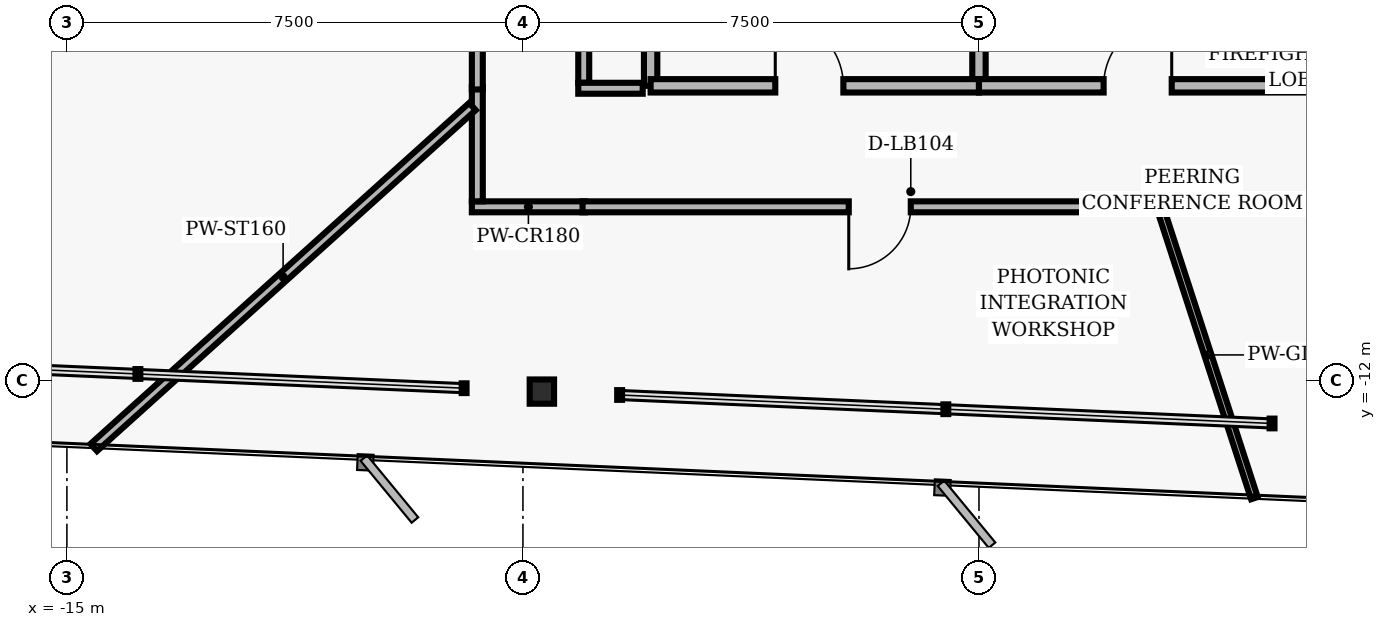
"""IFC4 building model, lengths in metres.
Left out: names, types, materials, properties, quantities, classifications, styles, units other than length and angle.
Written with IfcOpenShell. Run it as: python <this file> out.ifc"""

import sys

from ifc_helpers import new_model, si_unit, direction, frame, frame_2d, origin, origin_2d, place, context, subcontext, project, spatial, rectangle, i_section, extrude, element, fill, save


model = new_model("IFC4")
c1 = context("Model", 3, precision=1e-05, world=origin(), true_north=direction((0.0, 1.0)))
c2 = subcontext(c1, "Body", "Model", "MODEL_VIEW")
j1 = project(units=[si_unit("LENGTHUNIT", "METRE"), si_unit("PLANEANGLEUNIT", "RADIAN")], contexts=[c1])
p1 = place(None, origin())
s1 = spatial("IfcSite", under=j1, at=p1, CompositionType="ELEMENT")
p2 = place(p1, origin())
s2 = spatial("IfcBuilding", under=s1, at=p2, CompositionType="ELEMENT")
p3 = place(p2, frame((0.0, 0.0, 138.08)))
s3 = spatial("IfcBuildingStorey", under=s2, at=p3, CompositionType="ELEMENT", Elevation=138.08)
p4 = place(p3, frame((-7.188, -12.189, 0.0), z_axis=(0.0, 0.0, 1.0), x_axis=(1.0, 0.0, 0.0)))
e1 = element("IfcColumn", 1, at=p4, inside=s3, PredefinedType="COLUMN", context=c2, shape_type="SweptSolid", body=[
    extrude(i_section(OverallWidth=0.401, OverallDepth=0.399, WebThickness=0.025, FlangeThickness=0.04, FilletRadius=0.018, at=origin_2d()), origin(), (0.0, 0.0, 1.0), 3.04),
])
for number, where, z_axis, x_axis in (
    (2, (-5.4, -7.16, 0.0), (0.0, 0.0, 1.0), (0.0, 1.0, 0.0)),
    (3, (5.4, -7.16, 0.0), (0.0, 0.0, 1.0), (0.0, 1.0, 0.0)),
):
    element("IfcWall", number, at=place(p3, frame(where, z_axis=z_axis, x_axis=x_axis)), inside=s3, PredefinedType="PARTITIONING", context=c2, shape_type="SweptSolid", body=[
        extrude(rectangle(XDim=2.71, YDim=0.22, at=frame_2d((1.355, 0.0))), origin(), (0.0, 0.0, 1.0), 2.763),
    ])
p5 = place(p3, frame((0.0, -7.16, 0.0), z_axis=(0.0, 0.0, 1.0), x_axis=(0.0, 1.0, 0.0)))
e4 = element("IfcWall", 4, at=p5, inside=s3, PredefinedType="PARTITIONING", context=c2, shape_type="SweptSolid", body=[
    extrude(rectangle(XDim=2.81, YDim=0.22, at=frame_2d((1.405, 0.0))), origin(), (0.0, 0.0, 1.0), 2.763),
])
p6 = place(p3, frame((-5.4, -7.16, 0.0), z_axis=(0.0, 0.0, 1.0), x_axis=(1.0, 0.0, 0.0)))
e5 = element("IfcWall", 5, at=p6, inside=s3, PredefinedType="PARTITIONING", context=c2, shape_type="SweptSolid", body=[
    extrude(rectangle(XDim=5.4, YDim=0.22, at=frame_2d((2.7, 0.0))), origin(), (0.0, 0.0, 1.0), 2.33),
])
p7 = place(p6, frame((2.05, 0.0, 0.0)))
e6 = element("IfcOpeningElement", 6, at=p7, cuts=e5, PredefinedType="OPENING", context=c2, shape_type="SweptSolid", body=[
    extrude(rectangle(XDim=1.12, YDim=2.02, at=frame_2d((0.56, 1.01))), frame((0.0, 0.12, 0.0), z_axis=(0.0, -1.0, 0.0), x_axis=(1.0, 0.0, 0.0)), (0.0, 0.0, 1.0), 0.24),
])
p8 = place(p3, frame((0.0, -7.16, 0.0), z_axis=(0.0, 0.0, 1.0), x_axis=(1.0, 0.0, 0.0)))
e7 = element("IfcWall", 7, at=p8, inside=s3, PredefinedType="PARTITIONING", context=c2, shape_type="SweptSolid", body=[
    extrude(rectangle(XDim=5.4, YDim=0.22, at=frame_2d((2.7, 0.0))), origin(), (0.0, 0.0, 1.0), 2.33),
])
p9 = place(p8, frame((2.05, 0.0, 0.0)))
e8 = element("IfcOpeningElement", 8, at=p9, cuts=e7, PredefinedType="OPENING", context=c2, shape_type="SweptSolid", body=[
    extrude(rectangle(XDim=1.12, YDim=2.02, at=frame_2d((0.56, 1.01))), frame((0.0, 0.12, 0.0), z_axis=(0.0, -1.0, 0.0), x_axis=(1.0, 0.0, 0.0)), (0.0, 0.0, 1.0), 0.24),
])
p10 = place(p3, frame((-6.48, -9.15, 0.0), z_axis=(0.0, 0.0, 1.0), x_axis=(-1.0, 0.0, 0.0)))
e9 = element("IfcWall", 9, at=p10, inside=s3, PredefinedType="PARTITIONING", context=c2, shape_type="SweptSolid", body=[
    extrude(rectangle(XDim=1.86, YDim=0.18, at=frame_2d((0.93, 0.0))), origin(), (0.0, 0.0, 1.0), 2.33),
])
p11 = place(p3, frame((-8.25, -9.06, 0.0), z_axis=(0.0, 0.0, 1.0), x_axis=(0.0, 1.0, 0.0)))
e10 = element("IfcWall", 10, at=p11, inside=s3, PredefinedType="PARTITIONING", context=c2, shape_type="SweptSolid", body=[
    extrude(rectangle(XDim=1.88, YDim=0.18, at=frame_2d((0.94, 0.0))), origin(), (0.0, 0.0, 1.0), 2.763),
])
p12 = place(p3, frame((-8.25, -7.22, 0.0), z_axis=(0.0, 0.0, 1.0), x_axis=(0.0, 1.0, 0.0)))
e11 = element("IfcWall", 11, at=p12, inside=s3, PredefinedType="PARTITIONING", context=c2, shape_type="SweptSolid", body=[
    extrude(rectangle(XDim=14.44, YDim=0.18, at=frame_2d((7.22, 0.0))), origin(), (0.0, 0.0, 1.0), 2.763),
])
p13 = place(p12, frame((3.406, 0.0, 0.0)))
e12 = element("IfcOpeningElement", 12, at=p13, cuts=e11, PredefinedType="OPENING", context=c2, shape_type="SweptSolid", body=[
    extrude(rectangle(XDim=0.96, YDim=2.02, at=frame_2d((0.48, 1.01))), frame((0.0, 0.1, 0.0), z_axis=(0.0, -1.0, 0.0), x_axis=(1.0, 0.0, 0.0)), (0.0, 0.0, 1.0), 0.2),
])
p14 = place(p12, frame((10.365, 0.0, 0.0)))
e13 = element("IfcOpeningElement", 13, at=p14, cuts=e11, PredefinedType="OPENING", context=c2, shape_type="SweptSolid", body=[
    extrude(rectangle(XDim=0.96, YDim=2.02, at=frame_2d((0.48, 1.01))), frame((0.0, 0.1, 0.0), z_axis=(0.0, -1.0, 0.0), x_axis=(1.0, 0.0, 0.0)), (0.0, 0.0, 1.0), 0.2),
])
p15 = place(p3, frame((10.98, -9.15, 0.0), z_axis=(0.0, 0.0, 1.0), x_axis=(-1.0, 0.0, 0.0)))
e14 = element("IfcWall", 14, at=p15, inside=s3, PredefinedType="PARTITIONING", context=c2, shape_type="SweptSolid", body=[
    extrude(rectangle(XDim=17.5, YDim=0.18, at=frame_2d((8.75, 0.0))), origin(), (0.0, 0.0, 1.0), 2.33),
])
p16 = place(p15, frame((12.102, 0.0, 0.0)))
e15 = element("IfcOpeningElement", 15, at=p16, cuts=e14, PredefinedType="OPENING", context=c2, shape_type="SweptSolid", body=[
    extrude(rectangle(XDim=1.02, YDim=2.02, at=frame_2d((0.51, 1.01))), frame((0.0, 0.1, 0.0), z_axis=(0.0, -1.0, 0.0), x_axis=(1.0, 0.0, 0.0)), (0.0, 0.0, 1.0), 0.2),
])
p17 = place(p15, frame((3.639, 0.0, 0.0)))
e16 = element("IfcOpeningElement", 16, at=p17, cuts=e14, PredefinedType="OPENING", context=c2, shape_type="SweptSolid", body=[
    extrude(rectangle(XDim=0.96, YDim=2.02, at=frame_2d((0.48, 1.01))), frame((0.0, 0.1, 0.0), z_axis=(0.0, -1.0, 0.0), x_axis=(1.0, 0.0, 0.0)), (0.0, 0.0, 1.0), 0.2),
])
p18 = place(p3, frame((-6.5, -4.88, 0.0), z_axis=(0.0, 0.0, 1.0), x_axis=(0.0, -1.0, 0.0)))
e17 = element("IfcWall", 17, at=p18, inside=s3, PredefinedType="PARTITIONING", context=c2, shape_type="SweptSolid", body=[
    extrude(rectangle(XDim=2.23, YDim=0.18, at=frame_2d((1.115, 0.0))), origin(), (0.0, 0.0, 1.0), 2.132),
])
p19 = place(p3, frame((-6.59, -7.2, 0.0), z_axis=(0.0, 0.0, 1.0), x_axis=(1.0, 0.0, 0.0)))
e18 = element("IfcWall", 18, at=p19, inside=s3, PredefinedType="PARTITIONING", context=c2, shape_type="SweptSolid", body=[
    extrude(rectangle(XDim=1.06, YDim=0.18, at=frame_2d((0.53, 0.0))), origin(), (0.0, 0.0, 1.0), 2.33),
])
p20 = place(p3, frame((-8.33, -7.5, 0.0), z_axis=(0.0, 0.0, 1.0), x_axis=(-0.743147832275, -0.669127266957, 0.0)))
e19 = element("IfcWall", 19, at=p20, inside=s3, PredefinedType="PARTITIONING", context=c2, shape_type="SweptSolid", body=[
    extrude(rectangle(XDim=8.381, YDim=0.16, at=frame_2d((4.19, 0.0))), origin(), (0.0, 0.0, 1.0), 2.763),
])
p21 = place(p3, frame((2.999, -9.23, 0.0), z_axis=(0.0, 0.0, 1.0), x_axis=(0.309019216851, -0.951055794166, 0.0)))
e20 = element("IfcWall", 20, at=p21, inside=s3, PredefinedType="MOVABLE", context=c2, shape_type="SweptSolid", body=[
    extrude(rectangle(XDim=4.954, YDim=0.115, at=frame_2d((2.477, 0.0))), origin(), (0.0, 0.0, 1.0), 2.763),
])
p22 = place(p7, origin())
e21 = element("IfcDoor", 21, at=p22, inside=s3, OperationType="SINGLE_SWING_LEFT", PredefinedType="DOOR", context=c2, shape_type="SweptSolid", body=[
    extrude(rectangle(XDim=1.12, YDim=2.02, at=frame_2d((0.56, 1.01))), frame((0.0, 0.025, 0.0), z_axis=(0.0, -1.0, 0.0), x_axis=(1.0, 0.0, 0.0)), (0.0, 0.0, 1.0), 0.05),
])
fill(e6, e21)
p23 = place(p9, origin())
e22 = element("IfcDoor", 22, at=p23, inside=s3, OperationType="SINGLE_SWING_RIGHT", PredefinedType="DOOR", context=c2, shape_type="SweptSolid", body=[
    extrude(rectangle(XDim=1.12, YDim=2.02, at=frame_2d((0.56, 1.01))), frame((0.0, 0.025, 0.0), z_axis=(0.0, -1.0, 0.0), x_axis=(1.0, 0.0, 0.0)), (0.0, 0.0, 1.0), 0.05),
])
fill(e8, e22)
p24 = place(p16, origin())
e23 = element("IfcDoor", 23, at=p24, inside=s3, OperationType="SINGLE_SWING_RIGHT", PredefinedType="DOOR", context=c2, shape_type="SweptSolid", body=[
    extrude(rectangle(XDim=1.02, YDim=2.02, at=frame_2d((0.51, 1.01))), frame((0.0, 0.025, 0.0), z_axis=(0.0, -1.0, 0.0), x_axis=(1.0, 0.0, 0.0)), (0.0, 0.0, 1.0), 0.05),
])
fill(e15, e23)
save(model, sys.argv[1])
